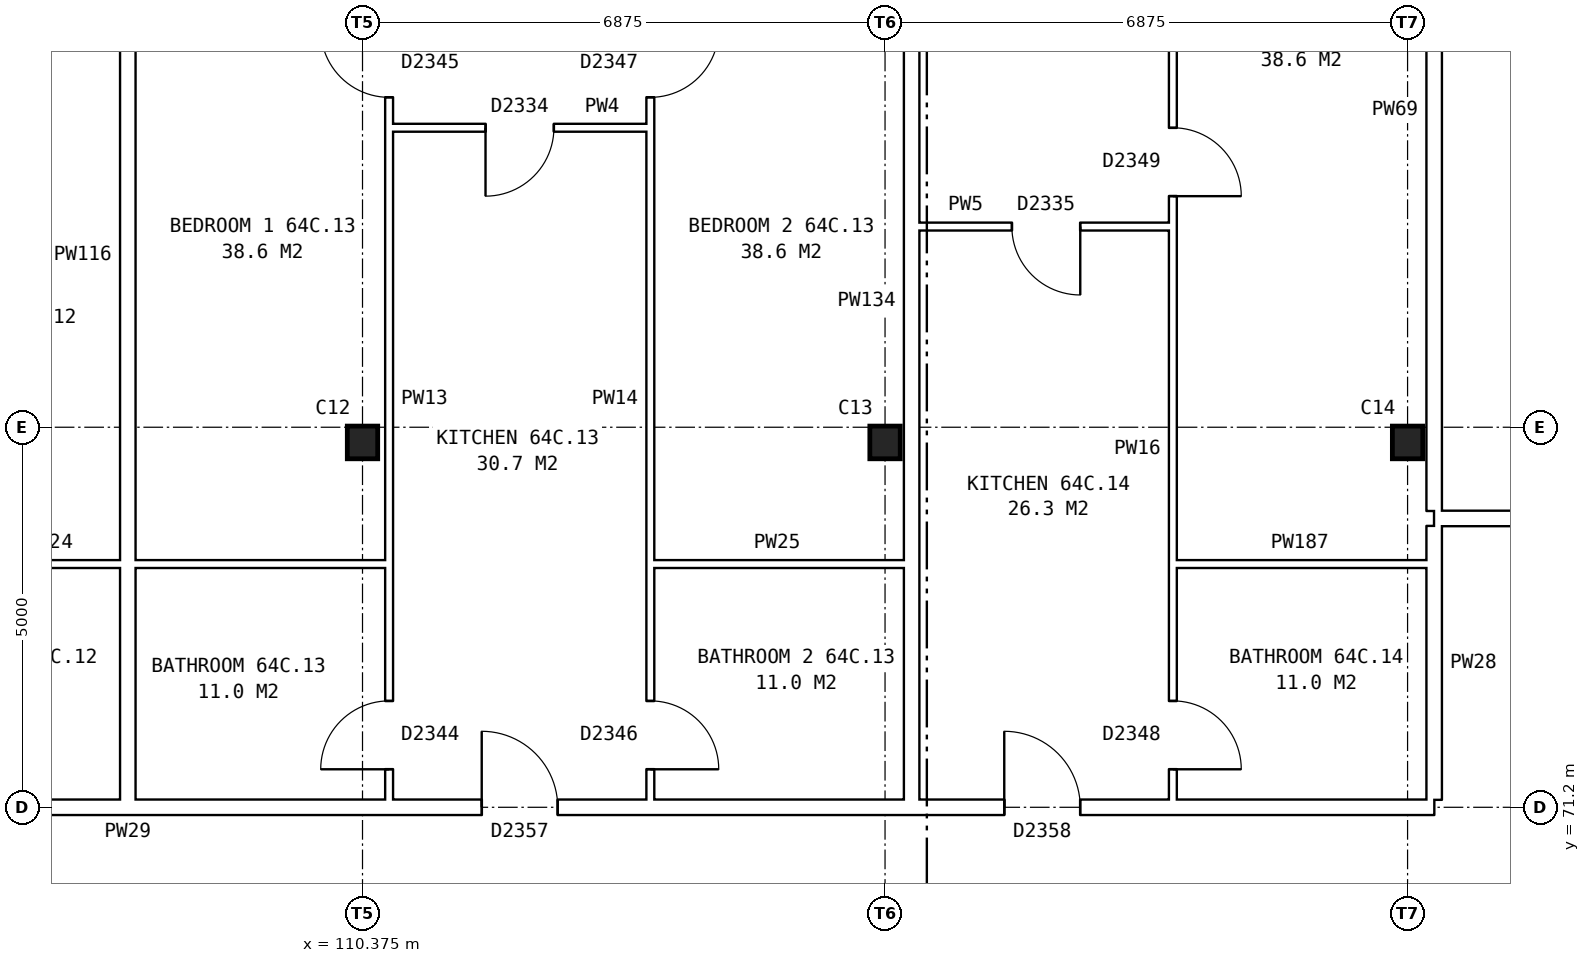
"""IFC4 building model, lengths in metres.
Left out: names, types, materials, properties, quantities, classifications, styles, units other than length and angle.
Written with IfcOpenShell. Run it as: python <this file> out.ifc"""

import sys

from ifc_helpers import new_model, si_unit, direction, frame, frame_2d, origin, origin_2d, place, context, subcontext, project, spatial, rectangle, i_section, extrude, element, fill, save


model = new_model("IFC4")
c1 = context("Model", 3, precision=1e-05, world=origin(), true_north=direction((0.0, 1.0)))
c2 = subcontext(c1, "Body", "Model", "MODEL_VIEW")
j1 = project(units=[si_unit("LENGTHUNIT", "METRE"), si_unit("PLANEANGLEUNIT", "RADIAN")], contexts=[c1])
p1 = place(None, origin())
s1 = spatial("IfcSite", under=j1, at=p1, CompositionType="ELEMENT")
p2 = place(p1, origin())
s2 = spatial("IfcBuilding", under=s1, at=p2, CompositionType="ELEMENT")
p3 = place(p2, frame((0.0, 0.0, 227.6)))
s3 = spatial("IfcBuildingStorey", under=s2, at=p3, CompositionType="ELEMENT", Elevation=227.6)
for number, where, z_axis, x_axis in (
    (1, (110.375, 76.0, 0.0), (0.0, 0.0, 1.0), (1.0, 0.0, 0.0)),
    (2, (117.25, 76.0, 0.0), (0.0, 0.0, 1.0), (1.0, 0.0, 0.0)),
    (3, (124.125, 76.0, 0.0), (0.0, 0.0, 1.0), (1.0, 0.0, 0.0)),
):
    element("IfcColumn", number, at=place(p3, frame(where, z_axis=z_axis, x_axis=x_axis)), inside=s3, PredefinedType="COLUMN", context=c2, shape_type="SweptSolid", body=[
        extrude(i_section(OverallWidth=0.4, OverallDepth=0.43, WebThickness=0.04, FlangeThickness=0.04, at=origin_2d()), origin(), (0.0, 0.0, 1.0), 2.85),
    ])
p4 = place(p3, frame((83.225, 71.2, 0.0), z_axis=(0.0, 0.0, 1.0), x_axis=(1.0, 0.0, 0.0)))
e4 = element("IfcWall", 4, at=p4, inside=s3, PredefinedType="PARTITIONING", context=c2, shape_type="SweptSolid", body=[
    extrude(rectangle(XDim=41.25, YDim=0.2, at=frame_2d((20.625, 0.0))), origin(), (0.0, 0.0, 1.0), 2.85),
])
p5 = place(p4, frame((4.656, 0.0, 0.0)))
e5 = element("IfcOpeningElement", 5, at=p5, cuts=e4, PredefinedType="OPENING", context=c2, shape_type="SweptSolid", body=[
    extrude(rectangle(XDim=1.0, YDim=2.1, at=frame_2d((0.5, 1.05))), frame((0.0, 0.11, 0.0), z_axis=(0.0, -1.0, 0.0), x_axis=(1.0, 0.0, 0.0)), (0.0, 0.0, 1.0), 0.22),
])
p6 = place(p4, frame((11.531, 0.0, 0.0)))
e6 = element("IfcOpeningElement", 6, at=p6, cuts=e4, PredefinedType="OPENING", context=c2, shape_type="SweptSolid", body=[
    extrude(rectangle(XDim=1.0, YDim=2.1, at=frame_2d((0.5, 1.05))), frame((0.0, 0.11, 0.0), z_axis=(0.0, -1.0, 0.0), x_axis=(1.0, 0.0, 0.0)), (0.0, 0.0, 1.0), 0.22),
])
p7 = place(p4, frame((18.406, 0.0, 0.0)))
e7 = element("IfcOpeningElement", 7, at=p7, cuts=e4, PredefinedType="OPENING", context=c2, shape_type="SweptSolid", body=[
    extrude(rectangle(XDim=1.0, YDim=2.1, at=frame_2d((0.5, 1.05))), frame((0.0, 0.11, 0.0), z_axis=(0.0, -1.0, 0.0), x_axis=(1.0, 0.0, 0.0)), (0.0, 0.0, 1.0), 0.22),
])
p8 = place(p4, frame((28.719, 0.0, 0.0)))
e8 = element("IfcOpeningElement", 8, at=p8, cuts=e4, PredefinedType="OPENING", context=c2, shape_type="SweptSolid", body=[
    extrude(rectangle(XDim=1.0, YDim=2.1, at=frame_2d((0.5, 1.05))), frame((0.0, 0.11, 0.0), z_axis=(0.0, -1.0, 0.0), x_axis=(1.0, 0.0, 0.0)), (0.0, 0.0, 1.0), 0.22),
])
p9 = place(p4, frame((35.594, 0.0, 0.0)))
e9 = element("IfcOpeningElement", 9, at=p9, cuts=e4, PredefinedType="OPENING", context=c2, shape_type="SweptSolid", body=[
    extrude(rectangle(XDim=1.0, YDim=2.1, at=frame_2d((0.5, 1.05))), frame((0.0, 0.11, 0.0), z_axis=(0.0, -1.0, 0.0), x_axis=(1.0, 0.0, 0.0)), (0.0, 0.0, 1.0), 0.22),
])
p10 = place(p3, frame((103.85, 74.4, 0.0), z_axis=(0.0, 0.0, 1.0), x_axis=(1.0, 0.0, 0.0)))
e10 = element("IfcWall", 10, at=p10, inside=s3, PredefinedType="PARTITIONING", context=c2, shape_type="SweptSolid", body=[
    extrude(rectangle(XDim=6.875, YDim=0.1, at=frame_2d((3.438, 0.0))), origin(), (0.0, 0.0, 1.0), 2.85),
])
for number, where, z_axis, x_axis in (
    (11, (114.162, 74.4, 0.0), (0.0, 0.0, 1.0), (1.0, 0.0, 0.0)),
    (12, (121.037, 74.4, 0.0), (0.0, 0.0, 1.0), (1.0, 0.0, 0.0)),
):
    element("IfcWall", number, at=place(p3, frame(where, z_axis=z_axis, x_axis=x_axis)), inside=s3, PredefinedType="PARTITIONING", context=c2, shape_type="SweptSolid", body=[
        extrude(rectangle(XDim=3.338, YDim=0.1, at=frame_2d((1.669, 0.0))), origin(), (0.0, 0.0, 1.0), 2.85),
    ])
p11 = place(p3, frame((124.475, 75.0, 0.0), z_axis=(0.0, 0.0, 1.0), x_axis=(1.0, 0.0, 0.0)))
e13 = element("IfcWall", 13, at=p11, inside=s3, PredefinedType="PARTITIONING", context=c2, shape_type="SweptSolid", body=[
    extrude(rectangle(XDim=6.885, YDim=0.2, at=frame_2d((3.442, 0.0))), origin(), (0.0, 0.0, 1.0), 2.85),
])
p12 = place(p11, frame((2.992, 0.0, 0.0)))
e14 = element("IfcOpeningElement", 14, at=p12, cuts=e13, PredefinedType="OPENING", context=c2, shape_type="SweptSolid", body=[
    extrude(rectangle(XDim=0.9, YDim=2.1, at=frame_2d((0.45, 1.05))), frame((0.0, 0.11, 0.0), z_axis=(0.0, -1.0, 0.0), x_axis=(1.0, 0.0, 0.0)), (0.0, 0.0, 1.0), 0.22),
])
p13 = place(p3, frame((117.7, 78.84, 0.0), z_axis=(0.0, 0.0, 1.0), x_axis=(1.0, 0.0, 0.0)))
e15 = element("IfcWall", 15, at=p13, inside=s3, PredefinedType="PARTITIONING", context=c2, shape_type="SweptSolid", body=[
    extrude(rectangle(XDim=3.337, YDim=0.1, at=frame_2d((1.668, 0.0))), origin(), (0.0, 0.0, 1.0), 2.85),
])
p14 = place(p13, frame((1.219, 0.0, 0.0)))
e16 = element("IfcOpeningElement", 16, at=p14, cuts=e15, PredefinedType="OPENING", context=c2, shape_type="SweptSolid", body=[
    extrude(rectangle(XDim=0.9, YDim=2.1, at=frame_2d((0.45, 1.05))), frame((0.0, 0.06, 0.0), z_axis=(0.0, -1.0, 0.0), x_axis=(1.0, 0.0, 0.0)), (0.0, 0.0, 1.0), 0.12),
])
p15 = place(p3, frame((110.725, 80.14, 0.0), z_axis=(0.0, 0.0, 1.0), x_axis=(1.0, 0.0, 0.0)))
e17 = element("IfcWall", 17, at=p15, inside=s3, PredefinedType="PARTITIONING", context=c2, shape_type="SweptSolid", body=[
    extrude(rectangle(XDim=3.437, YDim=0.1, at=frame_2d((1.719, 0.0))), origin(), (0.0, 0.0, 1.0), 2.85),
])
p16 = place(p15, frame((1.269, 0.0, 0.0)))
e18 = element("IfcOpeningElement", 18, at=p16, cuts=e17, PredefinedType="OPENING", context=c2, shape_type="SweptSolid", body=[
    extrude(rectangle(XDim=0.9, YDim=2.1, at=frame_2d((0.45, 1.05))), frame((0.0, 0.06, 0.0), z_axis=(0.0, -1.0, 0.0), x_axis=(1.0, 0.0, 0.0)), (0.0, 0.0, 1.0), 0.12),
])
p17 = place(p3, frame((107.287, 71.3, 0.0), z_axis=(0.0, 0.0, 1.0), x_axis=(0.0, 1.0, 0.0)))
e19 = element("IfcWall", 19, at=p17, inside=s3, PredefinedType="PARTITIONING", context=c2, shape_type="SweptSolid", body=[
    extrude(rectangle(XDim=14.34, YDim=0.2, at=frame_2d((7.17, 0.0))), origin(), (0.0, 0.0, 1.0), 2.85),
])
p18 = place(p3, frame((110.725, 71.3, 0.0), z_axis=(0.0, 0.0, 1.0), x_axis=(0.0, 1.0, 0.0)))
e20 = element("IfcWall", 20, at=p18, inside=s3, PredefinedType="PARTITIONING", context=c2, shape_type="SweptSolid", body=[
    extrude(rectangle(XDim=14.34, YDim=0.1, at=frame_2d((7.17, 0.0))), origin(), (0.0, 0.0, 1.0), 2.85),
])
p19 = place(p18, frame((9.24, 0.0, 0.0)))
e21 = element("IfcOpeningElement", 21, at=p19, cuts=e20, PredefinedType="OPENING", context=c2, shape_type="SweptSolid", body=[
    extrude(rectangle(XDim=0.9, YDim=2.1, at=frame_2d((0.45, 1.05))), frame((0.0, 0.06, 0.0), z_axis=(0.0, -1.0, 0.0), x_axis=(1.0, 0.0, 0.0)), (0.0, 0.0, 1.0), 0.12),
])
p20 = place(p18, frame((0.4, 0.0, 0.0)))
e22 = element("IfcOpeningElement", 22, at=p20, cuts=e20, PredefinedType="OPENING", context=c2, shape_type="SweptSolid", body=[
    extrude(rectangle(XDim=0.9, YDim=2.1, at=frame_2d((0.45, 1.05))), frame((0.0, 0.06, 0.0), z_axis=(0.0, -1.0, 0.0), x_axis=(1.0, 0.0, 0.0)), (0.0, 0.0, 1.0), 0.12),
])
p21 = place(p3, frame((114.162, 71.3, 0.0), z_axis=(0.0, 0.0, 1.0), x_axis=(0.0, 1.0, 0.0)))
e23 = element("IfcWall", 23, at=p21, inside=s3, PredefinedType="PARTITIONING", context=c2, shape_type="SweptSolid", body=[
    extrude(rectangle(XDim=14.34, YDim=0.1, at=frame_2d((7.17, 0.0))), origin(), (0.0, 0.0, 1.0), 2.85),
])
p22 = place(p21, frame((9.24, 0.0, 0.0)))
e24 = element("IfcOpeningElement", 24, at=p22, cuts=e23, PredefinedType="OPENING", context=c2, shape_type="SweptSolid", body=[
    extrude(rectangle(XDim=0.9, YDim=2.1, at=frame_2d((0.45, 1.05))), frame((0.0, 0.06, 0.0), z_axis=(0.0, -1.0, 0.0), x_axis=(1.0, 0.0, 0.0)), (0.0, 0.0, 1.0), 0.12),
])
p23 = place(p21, frame((0.4, 0.0, 0.0)))
e25 = element("IfcOpeningElement", 25, at=p23, cuts=e23, PredefinedType="OPENING", context=c2, shape_type="SweptSolid", body=[
    extrude(rectangle(XDim=0.9, YDim=2.1, at=frame_2d((0.45, 1.05))), frame((0.0, 0.06, 0.0), z_axis=(0.0, -1.0, 0.0), x_axis=(1.0, 0.0, 0.0)), (0.0, 0.0, 1.0), 0.12),
])
p24 = place(p3, frame((117.6, 71.3, 0.0), z_axis=(0.0, 0.0, 1.0), x_axis=(0.0, 1.0, 0.0)))
e26 = element("IfcWall", 26, at=p24, inside=s3, PredefinedType="PARTITIONING", context=c2, shape_type="SweptSolid", body=[
    extrude(rectangle(XDim=14.34, YDim=0.2, at=frame_2d((7.17, 0.0))), origin(), (0.0, 0.0, 1.0), 2.85),
])
p25 = place(p3, frame((121.037, 71.3, 0.0), z_axis=(0.0, 0.0, 1.0), x_axis=(0.0, 1.0, 0.0)))
e27 = element("IfcWall", 27, at=p25, inside=s3, PredefinedType="PARTITIONING", context=c2, shape_type="SweptSolid", body=[
    extrude(rectangle(XDim=14.34, YDim=0.1, at=frame_2d((7.17, 0.0))), origin(), (0.0, 0.0, 1.0), 2.85),
])
p26 = place(p25, frame((7.94, 0.0, 0.0)))
e28 = element("IfcOpeningElement", 28, at=p26, cuts=e27, PredefinedType="OPENING", context=c2, shape_type="SweptSolid", body=[
    extrude(rectangle(XDim=0.9, YDim=2.1, at=frame_2d((0.45, 1.05))), frame((0.0, 0.06, 0.0), z_axis=(0.0, -1.0, 0.0), x_axis=(1.0, 0.0, 0.0)), (0.0, 0.0, 1.0), 0.12),
])
p27 = place(p25, frame((0.4, 0.0, 0.0)))
e29 = element("IfcOpeningElement", 29, at=p27, cuts=e27, PredefinedType="OPENING", context=c2, shape_type="SweptSolid", body=[
    extrude(rectangle(XDim=0.9, YDim=2.1, at=frame_2d((0.45, 1.05))), frame((0.0, 0.06, 0.0), z_axis=(0.0, -1.0, 0.0), x_axis=(1.0, 0.0, 0.0)), (0.0, 0.0, 1.0), 0.12),
])
p28 = place(p3, frame((124.475, 71.3, 0.0), z_axis=(0.0, 0.0, 1.0), x_axis=(0.0, 1.0, 0.0)))
e30 = element("IfcWall", 30, at=p28, inside=s3, PredefinedType="PARTITIONING", context=c2, shape_type="SweptSolid", body=[
    extrude(rectangle(XDim=3.6, YDim=0.2, at=frame_2d((1.8, 0.0))), origin(), (0.0, 0.0, 1.0), 2.85),
])
p29 = place(p3, frame((124.475, 75.1, 0.0), z_axis=(0.0, 0.0, 1.0), x_axis=(0.0, 1.0, 0.0)))
e31 = element("IfcWall", 31, at=p29, inside=s3, PredefinedType="PARTITIONING", context=c2, shape_type="SweptSolid", body=[
    extrude(rectangle(XDim=10.54, YDim=0.2, at=frame_2d((5.27, 0.0))), origin(), (0.0, 0.0, 1.0), 2.85),
])
p30 = place(p19, origin())
e32 = element("IfcDoor", 32, at=p30, inside=s3, OperationType="SINGLE_SWING_RIGHT", PredefinedType="DOOR", context=c2, shape_type="SweptSolid", body=[
    extrude(rectangle(XDim=0.9, YDim=2.1, at=frame_2d((0.45, 1.05))), frame((0.0, 0.025, 0.0), z_axis=(0.0, -1.0, 0.0), x_axis=(1.0, 0.0, 0.0)), (0.0, 0.0, 1.0), 0.05),
])
fill(e21, e32)
p31 = place(p22, frame((0.9, 0.0, 0.0), z_axis=(0.0, 0.0, 1.0), x_axis=(-1.0, 0.0, 0.0)))
e33 = element("IfcDoor", 33, at=p31, inside=s3, OperationType="SINGLE_SWING_LEFT", PredefinedType="DOOR", context=c2, shape_type="SweptSolid", body=[
    extrude(rectangle(XDim=0.9, YDim=2.1, at=frame_2d((0.45, 1.05))), frame((0.0, 0.025, 0.0), z_axis=(0.0, -1.0, 0.0), x_axis=(1.0, 0.0, 0.0)), (0.0, 0.0, 1.0), 0.05),
])
fill(e24, e33)
p32 = place(p8, origin())
e34 = element("IfcDoor", 34, at=p32, inside=s3, OperationType="SINGLE_SWING_LEFT", PredefinedType="DOOR", context=c2, shape_type="SweptSolid", body=[
    extrude(rectangle(XDim=1.0, YDim=2.1, at=frame_2d((0.5, 1.05))), frame((0.0, 0.025, 0.0), z_axis=(0.0, -1.0, 0.0), x_axis=(1.0, 0.0, 0.0)), (0.0, 0.0, 1.0), 0.05),
])
fill(e8, e34)
p33 = place(p16, frame((0.9, 0.0, 0.0), z_axis=(0.0, 0.0, 1.0), x_axis=(-1.0, 0.0, 0.0)))
e35 = element("IfcDoor", 35, at=p33, inside=s3, OperationType="SINGLE_SWING_RIGHT", PredefinedType="DOOR", context=c2, shape_type="SweptSolid", body=[
    extrude(rectangle(XDim=0.9, YDim=2.1, at=frame_2d((0.45, 1.05))), frame((0.0, 0.025, 0.0), z_axis=(0.0, -1.0, 0.0), x_axis=(1.0, 0.0, 0.0)), (0.0, 0.0, 1.0), 0.05),
])
fill(e18, e35)
p34 = place(p20, origin())
e36 = element("IfcDoor", 36, at=p34, inside=s3, OperationType="SINGLE_SWING_LEFT", PredefinedType="DOOR", context=c2, shape_type="SweptSolid", body=[
    extrude(rectangle(XDim=0.9, YDim=2.1, at=frame_2d((0.45, 1.05))), frame((0.0, 0.025, 0.0), z_axis=(0.0, -1.0, 0.0), x_axis=(1.0, 0.0, 0.0)), (0.0, 0.0, 1.0), 0.05),
])
fill(e22, e36)
p35 = place(p23, frame((0.9, 0.0, 0.0), z_axis=(0.0, 0.0, 1.0), x_axis=(-1.0, 0.0, 0.0)))
e37 = element("IfcDoor", 37, at=p35, inside=s3, OperationType="SINGLE_SWING_RIGHT", PredefinedType="DOOR", context=c2, shape_type="SweptSolid", body=[
    extrude(rectangle(XDim=0.9, YDim=2.1, at=frame_2d((0.45, 1.05))), frame((0.0, 0.025, 0.0), z_axis=(0.0, -1.0, 0.0), x_axis=(1.0, 0.0, 0.0)), (0.0, 0.0, 1.0), 0.05),
])
fill(e25, e37)
p36 = place(p26, frame((0.9, 0.0, 0.0), z_axis=(0.0, 0.0, 1.0), x_axis=(-1.0, 0.0, 0.0)))
e38 = element("IfcDoor", 38, at=p36, inside=s3, OperationType="SINGLE_SWING_RIGHT", PredefinedType="DOOR", context=c2, shape_type="SweptSolid", body=[
    extrude(rectangle(XDim=0.9, YDim=2.1, at=frame_2d((0.45, 1.05))), frame((0.0, 0.025, 0.0), z_axis=(0.0, -1.0, 0.0), x_axis=(1.0, 0.0, 0.0)), (0.0, 0.0, 1.0), 0.05),
])
fill(e28, e38)
p37 = place(p9, origin())
e39 = element("IfcDoor", 39, at=p37, inside=s3, OperationType="SINGLE_SWING_LEFT", PredefinedType="DOOR", context=c2, shape_type="SweptSolid", body=[
    extrude(rectangle(XDim=1.0, YDim=2.1, at=frame_2d((0.5, 1.05))), frame((0.0, 0.025, 0.0), z_axis=(0.0, -1.0, 0.0), x_axis=(1.0, 0.0, 0.0)), (0.0, 0.0, 1.0), 0.05),
])
fill(e9, e39)
p38 = place(p14, frame((0.9, 0.0, 0.0), z_axis=(0.0, 0.0, 1.0), x_axis=(-1.0, 0.0, 0.0)))
e40 = element("IfcDoor", 40, at=p38, inside=s3, OperationType="SINGLE_SWING_LEFT", PredefinedType="DOOR", context=c2, shape_type="SweptSolid", body=[
    extrude(rectangle(XDim=0.9, YDim=2.1, at=frame_2d((0.45, 1.05))), frame((0.0, 0.025, 0.0), z_axis=(0.0, -1.0, 0.0), x_axis=(1.0, 0.0, 0.0)), (0.0, 0.0, 1.0), 0.05),
])
fill(e16, e40)
p39 = place(p27, frame((0.9, 0.0, 0.0), z_axis=(0.0, 0.0, 1.0), x_axis=(-1.0, 0.0, 0.0)))
e41 = element("IfcDoor", 41, at=p39, inside=s3, OperationType="SINGLE_SWING_RIGHT", PredefinedType="DOOR", context=c2, shape_type="SweptSolid", body=[
    extrude(rectangle(XDim=0.9, YDim=2.1, at=frame_2d((0.45, 1.05))), frame((0.0, 0.025, 0.0), z_axis=(0.0, -1.0, 0.0), x_axis=(1.0, 0.0, 0.0)), (0.0, 0.0, 1.0), 0.05),
])
fill(e29, e41)
save(model, sys.argv[1])
